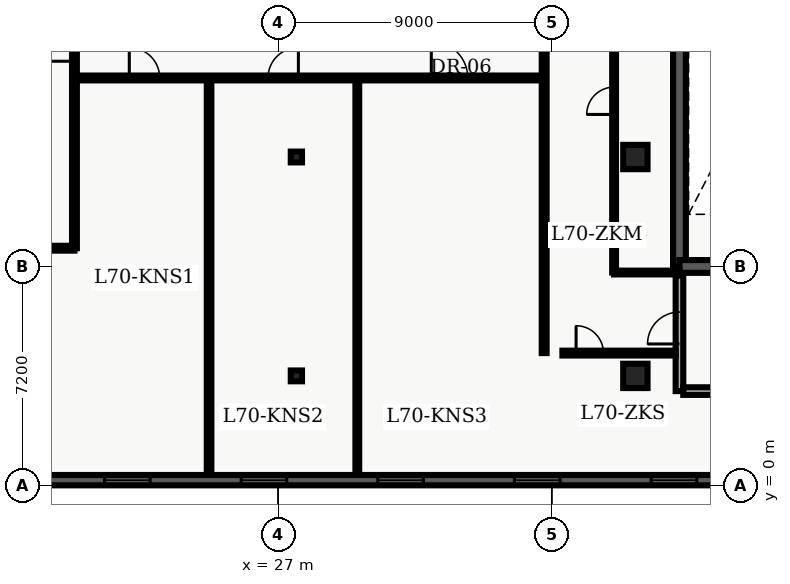
"""IFC4 building model, lengths in metres.
Left out: names, types, materials, properties, quantities, classifications, styles, units other than length and angle.
Written with IfcOpenShell. Run it as: python <this file> out.ifc"""

import sys

from ifc_helpers import new_model, entity, si_unit, converted_unit, direction, frame, origin_with_axes, origin_2d_with_axis, place, context, subcontext, project, spatial, polyline, rectangle, i_section, outline, extrude, element, fill, save


model = new_model("IFC4")
c1 = context("Model", 3, precision=1e-05, world=origin_with_axes(), true_north=direction((0.0, 1.0)))
c2 = subcontext(c1, "Body", "Model", "MODEL_VIEW")
j1 = project(units=[si_unit("LENGTHUNIT", "METRE"), converted_unit("PLANEANGLEUNIT", "DEGREE", entity("IfcPlaneAngleMeasure", 0.017), si_unit("PLANEANGLEUNIT", "RADIAN"), dimensions=[0, 0, 0, 0, 0, 0, 0])], contexts=[c1])
p1 = place(None, origin_with_axes())
s1 = spatial("IfcSite", under=j1, at=p1, CompositionType="ELEMENT")
p2 = place(p1, origin_with_axes())
s2 = spatial("IfcBuilding", under=s1, at=p2, CompositionType="ELEMENT")
p3 = place(p2, frame((0.0, 0.0, 284.1), z_axis=(0.0, 0.0, 1.0), x_axis=(1.0, 0.0, 0.0)))
s3 = spatial("IfcBuildingStorey", under=s2, at=p3, CompositionType="ELEMENT", Elevation=284.1)
p4 = place(p3, frame((40.2, 7.2, 0.0), z_axis=(0.0, 0.0, 1.0), x_axis=(0.0, 1.0, 0.0)))
e1 = element("IfcWall", 1, at=p4, inside=s3, PredefinedType="SHEAR", context=c2, shape_type="SweptSolid", body=[
    extrude(outline(polyline([(0.0, -0.21), (15.6, -0.21), (15.6, 0.21), (0.0, 0.21), (0.0, -0.21)])), origin_with_axes(), (0.0, 0.0, 1.0), 3.6),
])
p5 = place(p4, frame((12.75, 0.0, 0.0), z_axis=(0.0, 0.0, 1.0), x_axis=(1.0, 0.0, 0.0)))
e2 = element("IfcOpeningElement", 2, at=p5, cuts=e1, PredefinedType="OPENING", context=c2, shape_type="SweptSolid", body=[
    extrude(rectangle(XDim=1.2, YDim=0.44, at=origin_2d_with_axis()), origin_with_axes(), (0.0, 0.0, 1.0), 2.15),
])
p6 = place(p4, frame((9.3, 0.0, 0.0), z_axis=(0.0, 0.0, 1.0), x_axis=(1.0, 0.0, 0.0)))
e3 = element("IfcOpeningElement", 3, at=p6, cuts=e1, PredefinedType="OPENING", context=c2, shape_type="SweptSolid", body=[
    extrude(rectangle(XDim=0.9, YDim=0.44, at=origin_2d_with_axis()), origin_with_axes(), (0.0, 0.0, 1.0), 2.15),
])
p7 = place(p3, frame((40.2, 7.2, 0.0), z_axis=(0.0, 0.0, 1.0), x_axis=(1.0, 0.0, 0.0)))
e4 = element("IfcWall", 4, at=p7, inside=s3, PredefinedType="SHEAR", context=c2, shape_type="SweptSolid", body=[
    extrude(outline(polyline([(0.0, -0.21), (7.85, -0.21), (7.85, 0.21), (0.0, 0.21), (0.0, -0.21)])), origin_with_axes(), (0.0, 0.0, 1.0), 3.6),
])
p8 = place(p7, frame((2.175, 0.0, 0.0), z_axis=(0.0, 0.0, 1.0), x_axis=(1.0, 0.0, 0.0)))
e5 = element("IfcOpeningElement", 5, at=p8, cuts=e4, PredefinedType="OPENING", context=c2, shape_type="SweptSolid", body=[
    extrude(rectangle(XDim=1.05, YDim=0.44, at=origin_2d_with_axis()), origin_with_axes(), (0.0, 0.0, 1.0), 2.15),
])
p9 = place(p3, frame((40.2, 3.1, 0.0), z_axis=(0.0, 0.0, 1.0), x_axis=(0.0, 1.0, 0.0)))
e6 = element("IfcWall", 6, at=p9, inside=s3, PredefinedType="SOLIDWALL", context=c2, shape_type="SweptSolid", body=[
    extrude(outline(polyline([(0.0, -0.125), (3.8, -0.125), (3.8, 0.125), (0.0, 0.125), (0.0, -0.125)])), origin_with_axes(), (0.0, 0.0, 1.0), 2.64),
])
p10 = place(p9, frame((2.075, 0.0, 0.0), z_axis=(0.0, 0.0, 1.0), x_axis=(1.0, 0.0, 0.0)))
e7 = element("IfcOpeningElement", 7, at=p10, cuts=e6, PredefinedType="OPENING", context=c2, shape_type="SweptSolid", body=[
    extrude(rectangle(XDim=1.05, YDim=0.27, at=origin_2d_with_axis()), origin_with_axes(), (0.0, 0.0, 1.0), 2.15),
])
p11 = place(p3, frame((40.325, 3.1, 0.0), z_axis=(0.0, 0.0, 1.0), x_axis=(1.0, 0.0, 0.0)))
e8 = element("IfcWall", 8, at=p11, inside=s3, PredefinedType="SOLIDWALL", context=c2, shape_type="SweptSolid", body=[
    extrude(outline(polyline([(0.0, -0.125), (3.95, -0.125), (3.95, 0.125), (0.0, 0.125), (0.0, -0.125)])), origin_with_axes(), (0.0, 0.0, 1.0), 2.64),
])
for number, where, z_axis, x_axis in (
    (9, (27.6, 3.6, 0.0), (0.0, 0.0, 1.0), (1.0, 0.0, 0.0)),
    (10, (27.6, 10.8, 0.0), (0.0, 0.0, 1.0), (1.0, 0.0, 0.0)),
):
    element("IfcColumn", number, at=place(p3, frame(where, z_axis=z_axis, x_axis=x_axis)), inside=s3, PredefinedType="COLUMN", context=c2, shape_type="SweptSolid", body=[
        extrude(i_section(OverallWidth=0.369, OverallDepth=0.356, WebThickness=0.011, FlangeThickness=0.018, FilletRadius=0.018, at=origin_2d_with_axis()), origin_with_axes(), (0.0, 0.0, 1.0), 3.9),
    ])
for number, where, z_axis, x_axis in (
    (11, (38.75, 3.6, 0.0), (0.0, 0.0, 1.0), (1.0, 0.0, 0.0)),
    (12, (38.75, 10.8, 0.0), (0.0, 0.0, 1.0), (1.0, 0.0, 0.0)),
):
    element("IfcColumn", number, at=place(p3, frame(where, z_axis=z_axis, x_axis=x_axis)), inside=s3, PredefinedType="COLUMN", context=c2, shape_type="SweptSolid", body=[
        extrude(rectangle(XDim=0.8, YDim=0.8, at=origin_2d_with_axis()), origin_with_axes(), (0.0, 0.0, 1.0), 3.9),
    ])
p12 = place(p3, frame((8.135, 7.8, 0.0), z_axis=(0.0, 0.0, 1.0), x_axis=(1.0, 0.0, 0.0)))
e13 = element("IfcWall", 13, at=p12, inside=s3, PredefinedType="PARTITIONING", context=c2, shape_type="SweptSolid", body=[
    extrude(outline(polyline([(0.0, -0.08), (12.165, -0.08), (12.165, 0.08), (0.0, 0.08), (0.0, -0.08)])), origin_with_axes(), (0.0, 0.0, 1.0), 2.64),
])
p13 = place(p12, frame((6.065, 0.0, 0.0), z_axis=(0.0, 0.0, 1.0), x_axis=(1.0, 0.0, 0.0)))
e14 = element("IfcOpeningElement", 14, at=p13, cuts=e13, PredefinedType="OPENING", context=c2, shape_type="SweptSolid", body=[
    extrude(rectangle(XDim=1.0, YDim=0.18, at=origin_2d_with_axis()), origin_with_axes(), (0.0, 0.0, 1.0), 2.15),
])
p14 = place(p3, frame((20.3, 7.8, 0.0), z_axis=(0.0, 0.0, 1.0), x_axis=(0.0, 1.0, 0.0)))
e15 = element("IfcWall", 15, at=p14, inside=s3, PredefinedType="PARTITIONING", context=c2, shape_type="SweptSolid", body=[
    extrude(outline(polyline([(0.0, -0.08), (32.7, -0.08), (32.7, 0.08), (0.0, 0.08), (0.0, -0.08)])), origin_with_axes(), (0.0, 0.0, 1.0), 2.64),
])
p15 = place(p14, frame((25.025, 0.0, 0.0), z_axis=(0.0, 0.0, 1.0), x_axis=(1.0, 0.0, 0.0)))
e16 = element("IfcOpeningElement", 16, at=p15, cuts=e15, PredefinedType="OPENING", context=c2, shape_type="SweptSolid", body=[
    extrude(rectangle(XDim=1.05, YDim=0.18, at=origin_2d_with_axis()), origin_with_axes(), (0.0, 0.0, 1.0), 2.15),
])
p16 = place(p14, frame((14.273, 0.0, 0.0), z_axis=(0.0, 0.0, 1.0), x_axis=(1.0, 0.0, 0.0)))
e17 = element("IfcOpeningElement", 17, at=p16, cuts=e15, PredefinedType="OPENING", context=c2, shape_type="SweptSolid", body=[
    extrude(rectangle(XDim=1.0, YDim=0.18, at=origin_2d_with_axis()), origin_with_axes(), (0.0, 0.0, 1.0), 2.15),
])
p17 = place(p14, frame((18.447, 0.0, 0.0), z_axis=(0.0, 0.0, 1.0), x_axis=(1.0, 0.0, 0.0)))
e18 = element("IfcOpeningElement", 18, at=p17, cuts=e15, PredefinedType="OPENING", context=c2, shape_type="SweptSolid", body=[
    extrude(rectangle(XDim=1.0, YDim=0.18, at=origin_2d_with_axis()), origin_with_axes(), (0.0, 0.0, 1.0), 2.15),
])
p18 = place(p14, frame((6.675, 0.0, 0.0), z_axis=(0.0, 0.0, 1.0), x_axis=(1.0, 0.0, 0.0)))
e19 = element("IfcOpeningElement", 19, at=p18, cuts=e15, PredefinedType="OPENING", context=c2, shape_type="SweptSolid", body=[
    extrude(rectangle(XDim=1.05, YDim=0.18, at=origin_2d_with_axis()), origin_with_axes(), (0.0, 0.0, 1.0), 2.15),
])
p19 = place(p3, frame((20.3, 13.4, 0.0), z_axis=(0.0, 0.0, 1.0), x_axis=(1.0, 0.0, 0.0)))
e20 = element("IfcWall", 20, at=p19, inside=s3, PredefinedType="PARTITIONING", context=c2, shape_type="SweptSolid", body=[
    extrude(outline(polyline([(0.0, -0.08), (15.45, -0.08), (15.45, 0.08), (0.0, 0.08), (0.0, -0.08)])), origin_with_axes(), (0.0, 0.0, 1.0), 2.64),
])
p20 = place(p19, frame((2.304, 0.0, 0.0), z_axis=(0.0, 0.0, 1.0), x_axis=(1.0, 0.0, 0.0)))
e21 = element("IfcOpeningElement", 21, at=p20, cuts=e20, PredefinedType="OPENING", context=c2, shape_type="SweptSolid", body=[
    extrude(rectangle(XDim=1.0, YDim=0.18, at=origin_2d_with_axis()), origin_with_axes(), (0.0, 0.0, 1.0), 2.15),
])
p21 = place(p19, frame((6.866, 0.0, 0.0), z_axis=(0.0, 0.0, 1.0), x_axis=(1.0, 0.0, 0.0)))
e22 = element("IfcOpeningElement", 22, at=p21, cuts=e20, PredefinedType="OPENING", context=c2, shape_type="SweptSolid", body=[
    extrude(rectangle(XDim=1.0, YDim=0.18, at=origin_2d_with_axis()), origin_with_axes(), (0.0, 0.0, 1.0), 2.15),
])
p22 = place(p19, frame((12.337, 0.0, 0.0), z_axis=(0.0, 0.0, 1.0), x_axis=(1.0, 0.0, 0.0)))
e23 = element("IfcOpeningElement", 23, at=p22, cuts=e20, PredefinedType="OPENING", context=c2, shape_type="SweptSolid", body=[
    extrude(rectangle(XDim=1.2, YDim=0.18, at=origin_2d_with_axis()), origin_with_axes(), (0.0, 0.0, 1.0), 2.2),
])
p23 = place(p3, frame((35.75, 4.35, 0.0), z_axis=(0.0, 0.0, 1.0), x_axis=(0.0, 1.0, 0.0)))
e24 = element("IfcWall", 24, at=p23, inside=s3, PredefinedType="PARTITIONING", context=c2, shape_type="SweptSolid", body=[
    extrude(outline(polyline([(0.0, -0.08), (16.95, -0.08), (16.95, 0.08), (0.0, 0.08), (0.0, -0.08)])), origin_with_axes(), (0.0, 0.0, 1.0), 2.64),
])
p24 = place(p3, frame((24.728, 0.335, 0.0), z_axis=(0.0, 0.0, 1.0), x_axis=(0.0, 1.0, 0.0)))
e25 = element("IfcWall", 25, at=p24, inside=s3, PredefinedType="PARTITIONING", context=c2, shape_type="SweptSolid", body=[
    extrude(outline(polyline([(0.0, -0.075), (12.945, -0.075), (12.945, 0.075), (0.0, 0.075), (0.0, -0.075)])), origin_with_axes(), (0.0, 0.0, 1.0), 2.64),
])
p25 = place(p3, frame((29.604, 0.335, 0.0), z_axis=(0.0, 0.0, 1.0), x_axis=(0.0, 1.0, 0.0)))
e26 = element("IfcWall", 26, at=p25, inside=s3, PredefinedType="PARTITIONING", context=c2, shape_type="SweptSolid", body=[
    extrude(outline(polyline([(0.0, -0.062), (12.945, -0.062), (12.945, 0.062), (0.0, 0.062), (0.0, -0.062)])), origin_with_axes(), (0.0, 0.0, 1.0), 2.64),
])
p26 = place(p3, frame((36.35, 4.35, 0.0), z_axis=(0.0, 0.0, 1.0), x_axis=(1.0, 0.0, 0.0)))
e27 = element("IfcWall", 27, at=p26, inside=s3, PredefinedType="PARTITIONING", context=c2, shape_type="SweptSolid", body=[
    extrude(outline(polyline([(0.0, -0.08), (3.725, -0.08), (3.725, 0.08), (0.0, 0.08), (0.0, -0.08)])), origin_with_axes(), (0.0, 0.0, 1.0), 2.64),
])
p27 = place(p26, frame((0.9, 0.0, 0.0), z_axis=(0.0, 0.0, 1.0), x_axis=(1.0, 0.0, 0.0)))
e28 = element("IfcOpeningElement", 28, at=p27, cuts=e27, PredefinedType="OPENING", context=c2, shape_type="SweptSolid", body=[
    extrude(rectangle(XDim=0.9, YDim=0.18, at=origin_2d_with_axis()), origin_with_axes(), (0.0, 0.0, 1.0), 2.15),
])
p28 = place(p3, frame((38.05, 7.0, 0.0), z_axis=(0.0, 0.0, 1.0), x_axis=(1.0, 0.0, 0.0)))
e29 = element("IfcWall", 29, at=p28, inside=s3, PredefinedType="PARTITIONING", context=c2, shape_type="SweptSolid", body=[
    extrude(outline(polyline([(0.0, -0.062), (2.15, -0.062), (2.15, 0.062), (0.0, 0.062), (0.0, -0.062)])), origin_with_axes(), (0.0, 0.0, 1.0), 2.64),
])
p29 = place(p3, frame((38.05, 7.0, 0.0), z_axis=(0.0, 0.0, 1.0), x_axis=(0.0, 1.0, 0.0)))
e30 = element("IfcWall", 30, at=p29, inside=s3, PredefinedType="PARTITIONING", context=c2, shape_type="SweptSolid", body=[
    extrude(outline(polyline([(0.0, -0.062), (7.95, -0.062), (7.95, 0.062), (0.0, 0.062), (0.0, -0.062)])), origin_with_axes(), (0.0, 0.0, 1.0), 2.64),
])
p30 = place(p29, frame((5.65, 0.0, 0.0), z_axis=(0.0, 0.0, 1.0), x_axis=(1.0, 0.0, 0.0)))
e31 = element("IfcOpeningElement", 31, at=p30, cuts=e30, PredefinedType="OPENING", context=c2, shape_type="SweptSolid", body=[
    extrude(rectangle(XDim=0.9, YDim=0.145, at=origin_2d_with_axis()), origin_with_axes(), (0.0, 0.0, 1.0), 2.15),
])
p31 = place(p3, frame((47.36, 0.17, 0.0), z_axis=(0.0, 0.0, 1.0), x_axis=(-1.0, 0.0, 0.0)))
e32 = element("IfcWall", 32, at=p31, inside=s3, PredefinedType="SOLIDWALL", context=c2, shape_type="SweptSolid", body=[
    extrude(outline(polyline([(0.0, -0.17), (37.16, -0.17), (37.16, 0.17), (0.0, 0.17), (0.0, -0.17)])), origin_with_axes(), (0.0, 0.0, 1.0), 3.6),
])
p32 = place(p31, frame((2.847, 0.0, 0.45), z_axis=(0.0, 0.0, 1.0), x_axis=(1.0, 0.0, 0.0)))
e33 = element("IfcOpeningElement", 33, at=p32, cuts=e32, PredefinedType="OPENING", context=c2, shape_type="SweptSolid", body=[
    extrude(rectangle(XDim=1.5, YDim=0.36, at=origin_2d_with_axis()), origin_with_axes(), (0.0, 0.0, 1.0), 2.1),
])
p33 = place(p31, frame((7.342, 0.0, 0.45), z_axis=(0.0, 0.0, 1.0), x_axis=(1.0, 0.0, 0.0)))
e34 = element("IfcOpeningElement", 34, at=p33, cuts=e32, PredefinedType="OPENING", context=c2, shape_type="SweptSolid", body=[
    extrude(rectangle(XDim=1.5, YDim=0.36, at=origin_2d_with_axis()), origin_with_axes(), (0.0, 0.0, 1.0), 2.1),
])
p34 = place(p31, frame((11.837, 0.0, 0.45), z_axis=(0.0, 0.0, 1.0), x_axis=(1.0, 0.0, 0.0)))
e35 = element("IfcOpeningElement", 35, at=p34, cuts=e32, PredefinedType="OPENING", context=c2, shape_type="SweptSolid", body=[
    extrude(rectangle(XDim=1.5, YDim=0.36, at=origin_2d_with_axis()), origin_with_axes(), (0.0, 0.0, 1.0), 2.1),
])
p35 = place(p31, frame((16.332, 0.0, 0.45), z_axis=(0.0, 0.0, 1.0), x_axis=(1.0, 0.0, 0.0)))
e36 = element("IfcOpeningElement", 36, at=p35, cuts=e32, PredefinedType="OPENING", context=c2, shape_type="SweptSolid", body=[
    extrude(rectangle(XDim=1.5, YDim=0.36, at=origin_2d_with_axis()), origin_with_axes(), (0.0, 0.0, 1.0), 2.1),
])
p36 = place(p31, frame((20.827, 0.0, 0.45), z_axis=(0.0, 0.0, 1.0), x_axis=(1.0, 0.0, 0.0)))
e37 = element("IfcOpeningElement", 37, at=p36, cuts=e32, PredefinedType="OPENING", context=c2, shape_type="SweptSolid", body=[
    extrude(rectangle(XDim=1.5, YDim=0.36, at=origin_2d_with_axis()), origin_with_axes(), (0.0, 0.0, 1.0), 2.1),
])
p37 = place(p31, frame((25.322, 0.0, 0.45), z_axis=(0.0, 0.0, 1.0), x_axis=(1.0, 0.0, 0.0)))
e38 = element("IfcOpeningElement", 38, at=p37, cuts=e32, PredefinedType="OPENING", context=c2, shape_type="SweptSolid", body=[
    extrude(rectangle(XDim=1.5, YDim=0.36, at=origin_2d_with_axis()), origin_with_axes(), (0.0, 0.0, 1.0), 2.1),
])
p38 = place(p31, frame((29.817, 0.0, 0.45), z_axis=(0.0, 0.0, 1.0), x_axis=(1.0, 0.0, 0.0)))
e39 = element("IfcOpeningElement", 39, at=p38, cuts=e32, PredefinedType="OPENING", context=c2, shape_type="SweptSolid", body=[
    extrude(rectangle(XDim=1.5, YDim=0.36, at=origin_2d_with_axis()), origin_with_axes(), (0.0, 0.0, 1.0), 2.1),
])
p39 = place(p31, frame((34.312, 0.0, 0.45), z_axis=(0.0, 0.0, 1.0), x_axis=(1.0, 0.0, 0.0)))
e40 = element("IfcOpeningElement", 40, at=p39, cuts=e32, PredefinedType="OPENING", context=c2, shape_type="SweptSolid", body=[
    extrude(rectangle(XDim=1.5, YDim=0.36, at=origin_2d_with_axis()), origin_with_axes(), (0.0, 0.0, 1.0), 2.1),
])
p40 = place(p9, frame((2.075, 0.0, 0.0), z_axis=(0.0, 0.0, 1.0), x_axis=(1.0, 0.0, 0.0)))
e41 = element("IfcDoor", 41, at=p40, inside=s3, OperationType="SINGLE_SWING_LEFT", PredefinedType="DOOR", context=c2, shape_type="SweptSolid", body=[
    extrude(rectangle(XDim=1.05, YDim=0.09, at=origin_2d_with_axis()), origin_with_axes(), (0.0, 0.0, 1.0), 2.15),
])
fill(e7, e41)
p41 = place(p14, frame((6.675, 0.0, 0.0), z_axis=(0.0, 0.0, 1.0), x_axis=(1.0, 0.0, 0.0)))
e42 = element("IfcDoor", 42, at=p41, inside=s3, OperationType="SINGLE_SWING_LEFT", PredefinedType="DOOR", context=c2, shape_type="SweptSolid", body=[
    extrude(rectangle(XDim=1.05, YDim=0.09, at=origin_2d_with_axis()), origin_with_axes(), (0.0, 0.0, 1.0), 2.15),
])
fill(e19, e42)
p42 = place(p19, frame((2.304, 0.0, 0.0), z_axis=(0.0, 0.0, 1.0), x_axis=(1.0, 0.0, 0.0)))
e43 = element("IfcDoor", 43, at=p42, inside=s3, OperationType="SINGLE_SWING_LEFT", PredefinedType="DOOR", context=c2, shape_type="SweptSolid", body=[
    extrude(rectangle(XDim=1.0, YDim=0.09, at=origin_2d_with_axis()), origin_with_axes(), (0.0, 0.0, 1.0), 2.15),
])
fill(e21, e43)
p43 = place(p19, frame((6.866, 0.0, 0.0), z_axis=(0.0, 0.0, 1.0), x_axis=(1.0, 0.0, 0.0)))
e44 = element("IfcDoor", 44, at=p43, inside=s3, OperationType="SINGLE_SWING_RIGHT", PredefinedType="DOOR", context=c2, shape_type="SweptSolid", body=[
    extrude(rectangle(XDim=1.0, YDim=0.09, at=origin_2d_with_axis()), origin_with_axes(), (0.0, 0.0, 1.0), 2.15),
])
fill(e22, e44)
p44 = place(p19, frame((12.337, 0.0, 0.0), z_axis=(0.0, 0.0, 1.0), x_axis=(1.0, 0.0, 0.0)))
e45 = element("IfcDoor", 45, at=p44, inside=s3, OperationType="SINGLE_SWING_LEFT", PredefinedType="DOOR", context=c2, shape_type="SweptSolid", body=[
    extrude(rectangle(XDim=1.2, YDim=0.09, at=origin_2d_with_axis()), origin_with_axes(), (0.0, 0.0, 1.0), 2.2),
])
fill(e23, e45)
p45 = place(p26, frame((0.9, 0.0, 0.0), z_axis=(0.0, 0.0, 1.0), x_axis=(1.0, 0.0, 0.0)))
e46 = element("IfcDoor", 46, at=p45, inside=s3, OperationType="SINGLE_SWING_LEFT", PredefinedType="DOOR", context=c2, shape_type="SweptSolid", body=[
    extrude(rectangle(XDim=0.9, YDim=0.09, at=origin_2d_with_axis()), origin_with_axes(), (0.0, 0.0, 1.0), 2.15),
])
fill(e28, e46)
p46 = place(p29, frame((5.65, 0.0, 0.0), z_axis=(0.0, 0.0, 1.0), x_axis=(1.0, 0.0, 0.0)))
e47 = element("IfcDoor", 47, at=p46, inside=s3, OperationType="SINGLE_SWING_LEFT", PredefinedType="DOOR", context=c2, shape_type="SweptSolid", body=[
    extrude(rectangle(XDim=0.9, YDim=0.075, at=origin_2d_with_axis()), origin_with_axes(), (0.0, 0.0, 1.0), 2.15),
])
fill(e31, e47)
p47 = place(p31, frame((7.342, 0.0, 0.45), z_axis=(0.0, 0.0, 1.0), x_axis=(1.0, 0.0, 0.0)))
e48 = element("IfcWindow", 48, at=p47, inside=s3, PredefinedType="WINDOW", context=c2, shape_type="SweptSolid", body=[
    extrude(rectangle(XDim=1.5, YDim=0.09, at=origin_2d_with_axis()), origin_with_axes(), (0.0, 0.0, 1.0), 2.1),
])
fill(e34, e48)
p48 = place(p31, frame((11.837, 0.0, 0.45), z_axis=(0.0, 0.0, 1.0), x_axis=(1.0, 0.0, 0.0)))
e49 = element("IfcWindow", 49, at=p48, inside=s3, PredefinedType="WINDOW", context=c2, shape_type="SweptSolid", body=[
    extrude(rectangle(XDim=1.5, YDim=0.09, at=origin_2d_with_axis()), origin_with_axes(), (0.0, 0.0, 1.0), 2.1),
])
fill(e35, e49)
p49 = place(p31, frame((16.332, 0.0, 0.45), z_axis=(0.0, 0.0, 1.0), x_axis=(1.0, 0.0, 0.0)))
e50 = element("IfcWindow", 50, at=p49, inside=s3, PredefinedType="WINDOW", context=c2, shape_type="SweptSolid", body=[
    extrude(rectangle(XDim=1.5, YDim=0.09, at=origin_2d_with_axis()), origin_with_axes(), (0.0, 0.0, 1.0), 2.1),
])
fill(e36, e50)
p50 = place(p31, frame((20.827, 0.0, 0.45), z_axis=(0.0, 0.0, 1.0), x_axis=(1.0, 0.0, 0.0)))
e51 = element("IfcWindow", 51, at=p50, inside=s3, PredefinedType="WINDOW", context=c2, shape_type="SweptSolid", body=[
    extrude(rectangle(XDim=1.5, YDim=0.09, at=origin_2d_with_axis()), origin_with_axes(), (0.0, 0.0, 1.0), 2.1),
])
fill(e37, e51)
p51 = place(p31, frame((25.322, 0.0, 0.45), z_axis=(0.0, 0.0, 1.0), x_axis=(1.0, 0.0, 0.0)))
e52 = element("IfcWindow", 52, at=p51, inside=s3, PredefinedType="WINDOW", context=c2, shape_type="SweptSolid", body=[
    extrude(rectangle(XDim=1.5, YDim=0.09, at=origin_2d_with_axis()), origin_with_axes(), (0.0, 0.0, 1.0), 2.1),
])
fill(e38, e52)
save(model, sys.argv[1])
